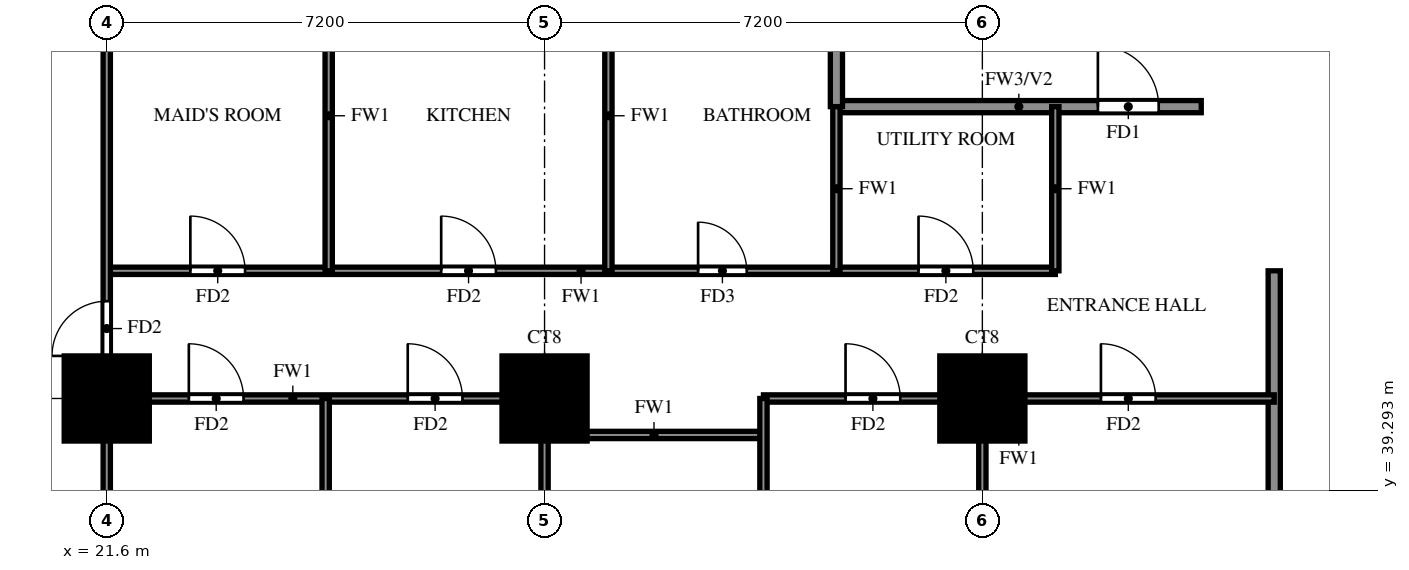
"""IFC4 building model, lengths in metres.
Left out: names, types, materials, properties, quantities, classifications, styles, units other than length and angle.
Written with IfcOpenShell. Run it as: python <this file> out.ifc"""

import sys

from ifc_helpers import new_model, si_unit, direction, frame, frame_2d, origin, origin_2d, place, context, subcontext, project, spatial, rectangle, extrude, source, transform, mapped, element, fill, save


model = new_model("IFC4")
c1 = context("Model", 3, precision=1e-05, world=origin(), true_north=direction((0.0, 1.0)))
c2 = subcontext(c1, "Body", "Model", "MODEL_VIEW")
j1 = project(units=[si_unit("LENGTHUNIT", "METRE"), si_unit("PLANEANGLEUNIT", "RADIAN")], contexts=[c1])
p1 = place(None, origin())
s1 = spatial("IfcSite", under=j1, at=p1, CompositionType="ELEMENT")
p2 = place(p1, origin())
s2 = spatial("IfcBuilding", under=s1, at=p2, CompositionType="ELEMENT")
p3 = place(p2, frame((0.0, 0.0, 37.5)))
s3 = spatial("IfcBuildingStorey", under=s2, at=p3, CompositionType="ELEMENT", Elevation=37.5)
m1 = source(origin(), c2, "Body", "SweptSolid", [
    extrude(rectangle(XDim=1.4, YDim=1.4, at=origin_2d()), origin(), (0.0, 0.0, 1.0), 3.18),
])
for number, where, z_axis, x_axis in (
    (1, (21.6, 40.8, 0.0), (0.0, 0.0, 1.0), (1.0, 0.0, 0.0)),
    (2, (28.8, 40.8, 0.0), (0.0, 0.0, 1.0), (1.0, 0.0, 0.0)),
    (3, (36.0, 40.8, 0.0), (0.0, 0.0, 1.0), (1.0, 0.0, 0.0)),
):
    element("IfcColumn", number, at=place(p3, frame(where, z_axis=z_axis, x_axis=x_axis)), inside=s3, PredefinedType="COLUMN", context=c2, shape_type="MappedRepresentation", body=[
        mapped(m1, transform((0.0, 0.0, 0.0))),
    ])
p4 = place(p3, frame((33.6, 45.6, 0.0), z_axis=(0.0, 0.0, 1.0), x_axis=(1.0, 0.0, 0.0)))
e4 = element("IfcWall", 4, at=p4, inside=s3, PredefinedType="SOLIDWALL", context=c2, shape_type="SweptSolid", body=[
    extrude(rectangle(XDim=6.0, YDim=0.2, at=frame_2d((3.0, 0.0))), origin(), (0.0, 0.0, 1.0), 3.18),
])
p5 = place(p4, frame((4.3, 0.0, 0.0)))
e5 = element("IfcOpeningElement", 5, at=p5, cuts=e4, PredefinedType="OPENING", context=c2, shape_type="SweptSolid", body=[
    extrude(rectangle(XDim=1.0, YDim=2.1, at=frame_2d((0.5, 1.05))), frame((0.0, 0.11, 0.0), z_axis=(0.0, -1.0, 0.0), x_axis=(1.0, 0.0, 0.0)), (0.0, 0.0, 1.0), 0.22),
])
p6 = place(p3, frame((33.6, 45.6, 0.0), z_axis=(0.0, 0.0, 1.0), x_axis=(0.0, 1.0, 0.0)))
e6 = element("IfcWall", 6, at=p6, inside=s3, PredefinedType="SOLIDWALL", context=c2, shape_type="SweptSolid", body=[
    extrude(rectangle(XDim=14.4, YDim=0.2, at=frame_2d((7.2, 0.0))), origin(), (0.0, 0.0, 1.0), 3.18),
])
p7 = place(p3, frame((40.8, 33.725, 0.0), z_axis=(0.0, 0.0, 1.0), x_axis=(0.0, 1.0, 0.0)))
e7 = element("IfcWall", 7, at=p7, inside=s3, PredefinedType="SOLIDWALL", context=c2, shape_type="SweptSolid", body=[
    extrude(rectangle(XDim=9.175, YDim=0.2, at=frame_2d((4.587, 0.0))), origin(), (0.0, 0.0, 1.0), 2.28),
])
p8 = place(p3, frame((28.8, 40.2, 0.0), z_axis=(0.0, 0.0, 1.0), x_axis=(1.0, 0.0, 0.0)))
e8 = element("IfcWall", 8, at=p8, inside=s3, PredefinedType="PARTITIONING", context=c2, shape_type="SweptSolid", body=[
    extrude(rectangle(XDim=3.6, YDim=0.12, at=frame_2d((1.8, 0.0))), origin(), (0.0, 0.0, 1.0), 3.18),
])
p9 = place(p3, frame((21.6, 40.8, 0.0), z_axis=(0.0, 0.0, 1.0), x_axis=(1.0, 0.0, 0.0)))
e9 = element("IfcWall", 9, at=p9, inside=s3, PredefinedType="PARTITIONING", context=c2, shape_type="SweptSolid", body=[
    extrude(rectangle(XDim=7.2, YDim=0.12, at=frame_2d((3.6, 0.0))), origin(), (0.0, 0.0, 1.0), 3.18),
])
p10 = place(p9, frame((1.35, 0.0, 0.0)))
e10 = element("IfcOpeningElement", 10, at=p10, cuts=e9, PredefinedType="OPENING", context=c2, shape_type="SweptSolid", body=[
    extrude(rectangle(XDim=0.9, YDim=2.1, at=frame_2d((0.45, 1.05))), frame((0.0, 0.07, 0.0), z_axis=(0.0, -1.0, 0.0), x_axis=(1.0, 0.0, 0.0)), (0.0, 0.0, 1.0), 0.14),
])
p11 = place(p9, frame((4.95, 0.0, 0.0)))
e11 = element("IfcOpeningElement", 11, at=p11, cuts=e9, PredefinedType="OPENING", context=c2, shape_type="SweptSolid", body=[
    extrude(rectangle(XDim=0.9, YDim=2.1, at=frame_2d((0.45, 1.05))), frame((0.0, 0.07, 0.0), z_axis=(0.0, -1.0, 0.0), x_axis=(1.0, 0.0, 0.0)), (0.0, 0.0, 1.0), 0.14),
])
p12 = place(p3, frame((32.4, 40.8, 0.0), z_axis=(0.0, 0.0, 1.0), x_axis=(1.0, 0.0, 0.0)))
e12 = element("IfcWall", 12, at=p12, inside=s3, PredefinedType="PARTITIONING", context=c2, shape_type="SweptSolid", body=[
    extrude(rectangle(XDim=8.4, YDim=0.12, at=frame_2d((4.2, 0.0))), origin(), (0.0, 0.0, 1.0), 3.18),
])
p13 = place(p12, frame((1.35, 0.0, 0.0)))
e13 = element("IfcOpeningElement", 13, at=p13, cuts=e12, PredefinedType="OPENING", context=c2, shape_type="SweptSolid", body=[
    extrude(rectangle(XDim=0.9, YDim=2.1, at=frame_2d((0.45, 1.05))), frame((0.0, 0.07, 0.0), z_axis=(0.0, -1.0, 0.0), x_axis=(1.0, 0.0, 0.0)), (0.0, 0.0, 1.0), 0.14),
])
p14 = place(p12, frame((5.55, 0.0, 0.0)))
e14 = element("IfcOpeningElement", 14, at=p14, cuts=e12, PredefinedType="OPENING", context=c2, shape_type="SweptSolid", body=[
    extrude(rectangle(XDim=0.9, YDim=2.1, at=frame_2d((0.45, 1.05))), frame((0.0, 0.07, 0.0), z_axis=(0.0, -1.0, 0.0), x_axis=(1.0, 0.0, 0.0)), (0.0, 0.0, 1.0), 0.14),
])
p15 = place(p3, frame((21.6, 42.9, 0.0), z_axis=(0.0, 0.0, 1.0), x_axis=(1.0, 0.0, 0.0)))
e15 = element("IfcWall", 15, at=p15, inside=s3, PredefinedType="PARTITIONING", context=c2, shape_type="SweptSolid", body=[
    extrude(rectangle(XDim=15.6, YDim=0.12, at=frame_2d((7.8, 0.0))), origin(), (0.0, 0.0, 1.0), 3.18),
])
p16 = place(p15, frame((1.375, 0.0, 0.0)))
e16 = element("IfcOpeningElement", 16, at=p16, cuts=e15, PredefinedType="OPENING", context=c2, shape_type="SweptSolid", body=[
    extrude(rectangle(XDim=0.9, YDim=2.1, at=frame_2d((0.45, 1.05))), frame((0.0, 0.07, 0.0), z_axis=(0.0, -1.0, 0.0), x_axis=(1.0, 0.0, 0.0)), (0.0, 0.0, 1.0), 0.14),
])
p17 = place(p15, frame((5.5, 0.0, 0.0)))
e17 = element("IfcOpeningElement", 17, at=p17, cuts=e15, PredefinedType="OPENING", context=c2, shape_type="SweptSolid", body=[
    extrude(rectangle(XDim=0.9, YDim=2.1, at=frame_2d((0.45, 1.05))), frame((0.0, 0.07, 0.0), z_axis=(0.0, -1.0, 0.0), x_axis=(1.0, 0.0, 0.0)), (0.0, 0.0, 1.0), 0.14),
])
p18 = place(p15, frame((9.725, 0.0, 0.0)))
e18 = element("IfcOpeningElement", 18, at=p18, cuts=e15, PredefinedType="OPENING", context=c2, shape_type="SweptSolid", body=[
    extrude(rectangle(XDim=0.8, YDim=2.1, at=frame_2d((0.4, 1.05))), frame((0.0, 0.07, 0.0), z_axis=(0.0, -1.0, 0.0), x_axis=(1.0, 0.0, 0.0)), (0.0, 0.0, 1.0), 0.14),
])
p19 = place(p15, frame((13.35, 0.0, 0.0)))
e19 = element("IfcOpeningElement", 19, at=p19, cuts=e15, PredefinedType="OPENING", context=c2, shape_type="SweptSolid", body=[
    extrude(rectangle(XDim=0.9, YDim=2.1, at=frame_2d((0.45, 1.05))), frame((0.0, 0.07, 0.0), z_axis=(0.0, -1.0, 0.0), x_axis=(1.0, 0.0, 0.0)), (0.0, 0.0, 1.0), 0.14),
])
p20 = place(p3, frame((21.6, 33.725, 0.0), z_axis=(0.0, 0.0, 1.0), x_axis=(0.0, 1.0, 0.0)))
e20 = element("IfcWall", 20, at=p20, inside=s3, PredefinedType="PARTITIONING", context=c2, shape_type="SweptSolid", body=[
    extrude(rectangle(XDim=35.875, YDim=0.12, at=frame_2d((17.938, 0.0))), origin(), (0.0, 0.0, 1.0), 3.18),
])
p21 = place(p20, frame((7.775, 0.0, 0.0)))
e21 = element("IfcOpeningElement", 21, at=p21, cuts=e20, PredefinedType="OPENING", context=c2, shape_type="SweptSolid", body=[
    extrude(rectangle(XDim=0.9, YDim=2.1, at=frame_2d((0.45, 1.05))), frame((0.0, 0.07, 0.0), z_axis=(0.0, -1.0, 0.0), x_axis=(1.0, 0.0, 0.0)), (0.0, 0.0, 1.0), 0.14),
])
p22 = place(p20, frame((15.625, 0.0, 0.0)))
e22 = element("IfcOpeningElement", 22, at=p22, cuts=e20, PredefinedType="OPENING", context=c2, shape_type="SweptSolid", body=[
    extrude(rectangle(XDim=0.9, YDim=2.1, at=frame_2d((0.45, 1.05))), frame((0.0, 0.07, 0.0), z_axis=(0.0, -1.0, 0.0), x_axis=(1.0, 0.0, 0.0)), (0.0, 0.0, 1.0), 0.14),
])
p23 = place(p20, frame((22.225, 0.0, 0.0)))
e23 = element("IfcOpeningElement", 23, at=p23, cuts=e20, PredefinedType="OPENING", context=c2, shape_type="SweptSolid", body=[
    extrude(rectangle(XDim=1.5, YDim=2.1, at=frame_2d((0.75, 1.05))), frame((0.0, 0.07, 0.0), z_axis=(0.0, -1.0, 0.0), x_axis=(1.0, 0.0, 0.0)), (0.0, 0.0, 1.0), 0.14),
])
p24 = place(p20, frame((26.425, 0.0, 0.0)))
e24 = element("IfcOpeningElement", 24, at=p24, cuts=e20, PredefinedType="OPENING", context=c2, shape_type="SweptSolid", body=[
    extrude(rectangle(XDim=0.9, YDim=2.1, at=frame_2d((0.45, 1.05))), frame((0.0, 0.07, 0.0), z_axis=(0.0, -1.0, 0.0), x_axis=(1.0, 0.0, 0.0)), (0.0, 0.0, 1.0), 0.14),
])
p25 = place(p20, frame((30.025, 0.0, 0.0)))
e25 = element("IfcOpeningElement", 25, at=p25, cuts=e20, PredefinedType="OPENING", context=c2, shape_type="SweptSolid", body=[
    extrude(rectangle(XDim=0.9, YDim=2.1, at=frame_2d((0.45, 1.05))), frame((0.0, 0.07, 0.0), z_axis=(0.0, -1.0, 0.0), x_axis=(1.0, 0.0, 0.0)), (0.0, 0.0, 1.0), 0.14),
])
p26 = place(p20, frame((33.625, 0.0, 0.0)))
e26 = element("IfcOpeningElement", 26, at=p26, cuts=e20, PredefinedType="OPENING", context=c2, shape_type="SweptSolid", body=[
    extrude(rectangle(XDim=0.9, YDim=2.1, at=frame_2d((0.45, 1.05))), frame((0.0, 0.07, 0.0), z_axis=(0.0, -1.0, 0.0), x_axis=(1.0, 0.0, 0.0)), (0.0, 0.0, 1.0), 0.14),
])
p27 = place(p3, frame((25.2, 33.725, 0.0), z_axis=(0.0, 0.0, 1.0), x_axis=(0.0, 1.0, 0.0)))
e27 = element("IfcWall", 27, at=p27, inside=s3, PredefinedType="PARTITIONING", context=c2, shape_type="SweptSolid", body=[
    extrude(rectangle(XDim=7.075, YDim=0.12, at=frame_2d((3.538, 0.0))), origin(), (0.0, 0.0, 1.0), 2.28),
])
p28 = place(p3, frame((25.25, 42.9, 0.0), z_axis=(0.0, 0.0, 1.0), x_axis=(0.0, 1.0, 0.0)))
e28 = element("IfcWall", 28, at=p28, inside=s3, PredefinedType="PARTITIONING", context=c2, shape_type="SweptSolid", body=[
    extrude(rectangle(XDim=5.1, YDim=0.12, at=frame_2d((2.55, 0.0))), origin(), (0.0, 0.0, 1.0), 3.18),
])
p29 = place(p3, frame((28.8, 33.725, 0.0), z_axis=(0.0, 0.0, 1.0), x_axis=(0.0, 1.0, 0.0)))
e29 = element("IfcWall", 29, at=p29, inside=s3, PredefinedType="PARTITIONING", context=c2, shape_type="SweptSolid", body=[
    extrude(rectangle(XDim=7.075, YDim=0.12, at=frame_2d((3.538, 0.0))), origin(), (0.0, 0.0, 1.0), 3.18),
])
p30 = place(p29, frame((2.837, 0.0, 0.0)))
e30 = element("IfcOpeningElement", 30, at=p30, cuts=e29, PredefinedType="OPENING", context=c2, shape_type="SweptSolid", body=[
    extrude(rectangle(XDim=0.8, YDim=2.1, at=frame_2d((0.4, 1.05))), frame((0.0, 0.07, 0.0), z_axis=(0.0, -1.0, 0.0), x_axis=(1.0, 0.0, 0.0)), (0.0, 0.0, 1.0), 0.14),
])
p31 = place(p3, frame((29.85, 42.9, 0.0), z_axis=(0.0, 0.0, 1.0), x_axis=(0.0, 1.0, 0.0)))
e31 = element("IfcWall", 31, at=p31, inside=s3, PredefinedType="PARTITIONING", context=c2, shape_type="SweptSolid", body=[
    extrude(rectangle(XDim=5.1, YDim=0.12, at=frame_2d((2.55, 0.0))), origin(), (0.0, 0.0, 1.0), 3.18),
])
p32 = place(p3, frame((32.4, 33.725, 0.0), z_axis=(0.0, 0.0, 1.0), x_axis=(0.0, 1.0, 0.0)))
e32 = element("IfcWall", 32, at=p32, inside=s3, PredefinedType="PARTITIONING", context=c2, shape_type="SweptSolid", body=[
    extrude(rectangle(XDim=7.075, YDim=0.12, at=frame_2d((3.538, 0.0))), origin(), (0.0, 0.0, 1.0), 2.28),
])
p33 = place(p3, frame((33.6, 42.9, 0.0), z_axis=(0.0, 0.0, 1.0), x_axis=(0.0, 1.0, 0.0)))
e33 = element("IfcWall", 33, at=p33, inside=s3, PredefinedType="PARTITIONING", context=c2, shape_type="SweptSolid", body=[
    extrude(rectangle(XDim=2.7, YDim=0.12, at=frame_2d((1.35, 0.0))), origin(), (0.0, 0.0, 1.0), 3.18),
])
p34 = place(p3, frame((36.0, 33.725, 0.0), z_axis=(0.0, 0.0, 1.0), x_axis=(0.0, 1.0, 0.0)))
e34 = element("IfcWall", 34, at=p34, inside=s3, PredefinedType="PARTITIONING", context=c2, shape_type="SweptSolid", body=[
    extrude(rectangle(XDim=7.075, YDim=0.12, at=frame_2d((3.538, 0.0))), origin(), (0.0, 0.0, 1.0), 3.18),
])
p35 = place(p3, frame((37.2, 42.9, 0.0), z_axis=(0.0, 0.0, 1.0), x_axis=(0.0, 1.0, 0.0)))
e35 = element("IfcWall", 35, at=p35, inside=s3, PredefinedType="PARTITIONING", context=c2, shape_type="SweptSolid", body=[
    extrude(rectangle(XDim=2.7, YDim=0.12, at=frame_2d((1.35, 0.0))), origin(), (0.0, 0.0, 1.0), 3.18),
])
p36 = place(p5, origin())
e36 = element("IfcDoor", 36, at=p36, inside=s3, OperationType="SINGLE_SWING_LEFT", PredefinedType="DOOR", context=c2, shape_type="SweptSolid", body=[
    extrude(rectangle(XDim=1.0, YDim=2.1, at=frame_2d((0.5, 1.05))), frame((0.0, 0.025, 0.0), z_axis=(0.0, -1.0, 0.0), x_axis=(1.0, 0.0, 0.0)), (0.0, 0.0, 1.0), 0.05),
])
fill(e5, e36)
p37 = place(p21, origin())
e37 = element("IfcDoor", 37, at=p37, inside=s3, OperationType="SINGLE_SWING_LEFT", PredefinedType="DOOR", context=c2, shape_type="SweptSolid", body=[
    extrude(rectangle(XDim=0.9, YDim=2.1, at=frame_2d((0.45, 1.05))), frame((0.0, 0.025, 0.0), z_axis=(0.0, -1.0, 0.0), x_axis=(1.0, 0.0, 0.0)), (0.0, 0.0, 1.0), 0.05),
])
fill(e21, e37)
p38 = place(p10, origin())
e38 = element("IfcDoor", 38, at=p38, inside=s3, OperationType="SINGLE_SWING_LEFT", PredefinedType="DOOR", context=c2, shape_type="SweptSolid", body=[
    extrude(rectangle(XDim=0.9, YDim=2.1, at=frame_2d((0.45, 1.05))), frame((0.0, 0.025, 0.0), z_axis=(0.0, -1.0, 0.0), x_axis=(1.0, 0.0, 0.0)), (0.0, 0.0, 1.0), 0.05),
])
fill(e10, e38)
p39 = place(p11, origin())
e39 = element("IfcDoor", 39, at=p39, inside=s3, OperationType="SINGLE_SWING_LEFT", PredefinedType="DOOR", context=c2, shape_type="SweptSolid", body=[
    extrude(rectangle(XDim=0.9, YDim=2.1, at=frame_2d((0.45, 1.05))), frame((0.0, 0.025, 0.0), z_axis=(0.0, -1.0, 0.0), x_axis=(1.0, 0.0, 0.0)), (0.0, 0.0, 1.0), 0.05),
])
fill(e11, e39)
p40 = place(p13, origin())
e40 = element("IfcDoor", 40, at=p40, inside=s3, OperationType="SINGLE_SWING_LEFT", PredefinedType="DOOR", context=c2, shape_type="SweptSolid", body=[
    extrude(rectangle(XDim=0.9, YDim=2.1, at=frame_2d((0.45, 1.05))), frame((0.0, 0.025, 0.0), z_axis=(0.0, -1.0, 0.0), x_axis=(1.0, 0.0, 0.0)), (0.0, 0.0, 1.0), 0.05),
])
fill(e13, e40)
p41 = place(p14, origin())
e41 = element("IfcDoor", 41, at=p41, inside=s3, OperationType="SINGLE_SWING_LEFT", PredefinedType="DOOR", context=c2, shape_type="SweptSolid", body=[
    extrude(rectangle(XDim=0.9, YDim=2.1, at=frame_2d((0.45, 1.05))), frame((0.0, 0.025, 0.0), z_axis=(0.0, -1.0, 0.0), x_axis=(1.0, 0.0, 0.0)), (0.0, 0.0, 1.0), 0.05),
])
fill(e14, e41)
p42 = place(p16, origin())
e42 = element("IfcDoor", 42, at=p42, inside=s3, OperationType="SINGLE_SWING_RIGHT", PredefinedType="DOOR", context=c2, shape_type="SweptSolid", body=[
    extrude(rectangle(XDim=0.9, YDim=2.1, at=frame_2d((0.45, 1.05))), frame((0.0, 0.025, 0.0), z_axis=(0.0, -1.0, 0.0), x_axis=(1.0, 0.0, 0.0)), (0.0, 0.0, 1.0), 0.05),
])
fill(e16, e42)
p43 = place(p17, origin())
e43 = element("IfcDoor", 43, at=p43, inside=s3, OperationType="SINGLE_SWING_LEFT", PredefinedType="DOOR", context=c2, shape_type="SweptSolid", body=[
    extrude(rectangle(XDim=0.9, YDim=2.1, at=frame_2d((0.45, 1.05))), frame((0.0, 0.025, 0.0), z_axis=(0.0, -1.0, 0.0), x_axis=(1.0, 0.0, 0.0)), (0.0, 0.0, 1.0), 0.05),
])
fill(e17, e43)
p44 = place(p18, origin())
e44 = element("IfcDoor", 44, at=p44, inside=s3, OperationType="SINGLE_SWING_LEFT", PredefinedType="DOOR", context=c2, shape_type="SweptSolid", body=[
    extrude(rectangle(XDim=0.8, YDim=2.1, at=frame_2d((0.4, 1.05))), frame((0.0, 0.025, 0.0), z_axis=(0.0, -1.0, 0.0), x_axis=(1.0, 0.0, 0.0)), (0.0, 0.0, 1.0), 0.05),
])
fill(e18, e44)
p45 = place(p19, origin())
e45 = element("IfcDoor", 45, at=p45, inside=s3, OperationType="SINGLE_SWING_RIGHT", PredefinedType="DOOR", context=c2, shape_type="SweptSolid", body=[
    extrude(rectangle(XDim=0.9, YDim=2.1, at=frame_2d((0.45, 1.05))), frame((0.0, 0.025, 0.0), z_axis=(0.0, -1.0, 0.0), x_axis=(1.0, 0.0, 0.0)), (0.0, 0.0, 1.0), 0.05),
])
fill(e19, e45)
save(model, sys.argv[1])
